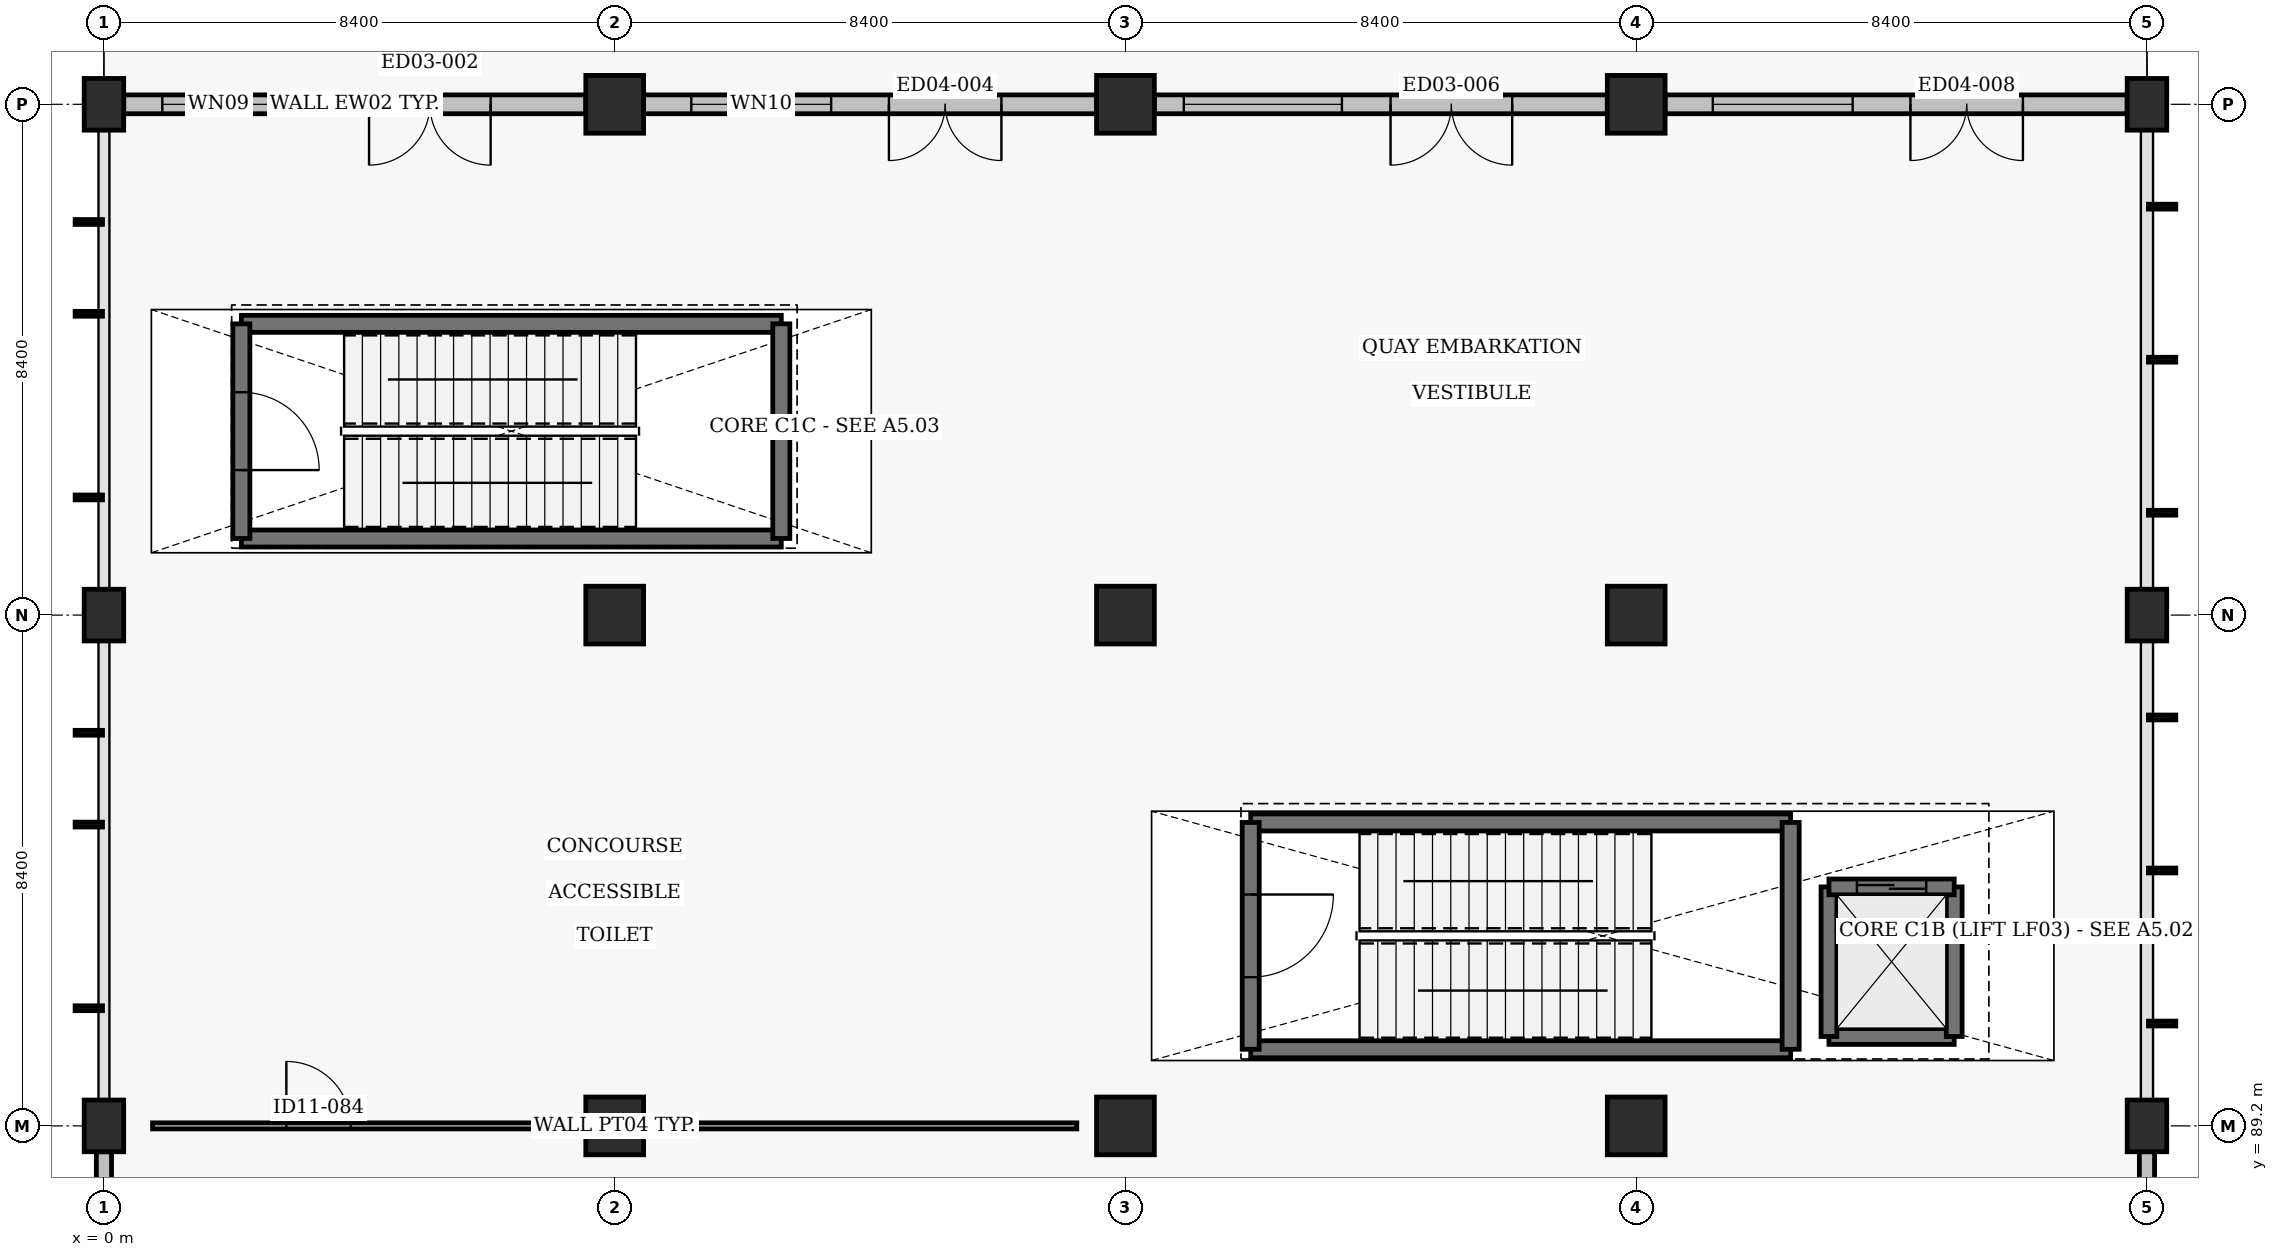
"""IFC4 building model, lengths in metres.
Left out: names, types, materials, properties, quantities, classifications, styles, units other than length and angle.
Written with IfcOpenShell. Run it as: python <this file> out.ifc"""

import sys

from ifc_helpers import new_model, si_unit, direction, frame, frame_2d, origin, origin_2d, place, context, subcontext, project, spatial, rectangle, circle, extrude, element, fill, save


model = new_model("IFC4")
c1 = context("Model", 3, precision=1e-05, world=origin(), true_north=direction((0.0, 1.0)))
c2 = subcontext(c1, "Body", "Model", "MODEL_VIEW")
j1 = project(units=[si_unit("LENGTHUNIT", "METRE"), si_unit("PLANEANGLEUNIT", "RADIAN")], contexts=[c1])
p1 = place(None, origin())
s1 = spatial("IfcSite", under=j1, at=p1, CompositionType="ELEMENT")
p2 = place(p1, origin())
s2 = spatial("IfcBuilding", under=s1, at=p2, CompositionType="ELEMENT")
p3 = place(p2, origin())
s3 = spatial("IfcBuildingStorey", under=s2, at=p3, CompositionType="ELEMENT", Elevation=0.0)
for number, where, z_axis, x_axis in (
    (1, (0.0, 89.2, -0.46), (0.0, 0.0, 1.0), (1.0, 0.0, 0.0)),
    (2, (0.0, 97.6, -0.46), (0.0, 0.0, 1.0), (1.0, 0.0, 0.0)),
    (3, (0.0, 106.0, -0.46), (0.0, 0.0, 1.0), (1.0, 0.0, 0.0)),
):
    element("IfcColumn", number, at=place(p3, frame(where, z_axis=z_axis, x_axis=x_axis)), inside=s3, PredefinedType="COLUMN", context=c2, shape_type="SweptSolid", body=[
        extrude(rectangle(XDim=0.65, YDim=0.85, at=origin_2d()), origin(), (0.0, 0.0, 1.0), 5.9),
    ])
for number, where, z_axis, x_axis in (
    (4, (8.4, 89.2, -0.46), (0.0, 0.0, 1.0), (1.0, 0.0, 0.0)),
    (5, (8.4, 97.6, -0.46), (0.0, 0.0, 1.0), (1.0, 0.0, 0.0)),
    (6, (8.4, 106.0, -0.46), (0.0, 0.0, 1.0), (1.0, 0.0, 0.0)),
    (7, (16.8, 89.2, -0.46), (0.0, 0.0, 1.0), (1.0, 0.0, 0.0)),
    (8, (16.8, 97.6, -0.46), (0.0, 0.0, 1.0), (1.0, 0.0, 0.0)),
    (9, (16.8, 106.0, -0.46), (0.0, 0.0, 1.0), (1.0, 0.0, 0.0)),
    (10, (25.2, 89.2, -0.46), (0.0, 0.0, 1.0), (1.0, 0.0, 0.0)),
    (11, (25.2, 97.6, -0.46), (0.0, 0.0, 1.0), (1.0, 0.0, 0.0)),
    (12, (25.2, 106.0, -0.46), (0.0, 0.0, 1.0), (1.0, 0.0, 0.0)),
):
    element("IfcColumn", number, at=place(p3, frame(where, z_axis=z_axis, x_axis=x_axis)), inside=s3, PredefinedType="COLUMN", context=c2, shape_type="SweptSolid", body=[
        extrude(circle(Radius=0.475, at=origin_2d()), origin(), (0.0, 0.0, 1.0), 5.9),
    ])
for number, where, z_axis, x_axis in (
    (13, (33.6, 89.2, -0.46), (0.0, 0.0, 1.0), (1.0, 0.0, 0.0)),
    (14, (33.6, 97.6, -0.46), (0.0, 0.0, 1.0), (1.0, 0.0, 0.0)),
    (15, (33.6, 106.0, -0.46), (0.0, 0.0, 1.0), (1.0, 0.0, 0.0)),
):
    element("IfcColumn", number, at=place(p3, frame(where, z_axis=z_axis, x_axis=x_axis)), inside=s3, PredefinedType="COLUMN", context=c2, shape_type="SweptSolid", body=[
        extrude(rectangle(XDim=0.65, YDim=0.85, at=origin_2d()), origin(), (0.0, 0.0, 1.0), 5.9),
    ])
p4 = place(p3, frame((7.925, 106.0, 0.0), z_axis=(0.0, 0.0, 1.0), x_axis=(-1.0, 0.0, 0.0)))
e16 = element("IfcWall", 16, at=p4, inside=s3, PredefinedType="SOLIDWALL", context=c2, shape_type="SweptSolid", body=[
    extrude(rectangle(XDim=7.6, YDim=0.31, at=frame_2d((3.8, 0.0))), origin(), (0.0, 0.0, 1.0), 4.795),
])
p5 = place(p4, frame((1.565, 0.0, 0.0)))
e17 = element("IfcOpeningElement", 17, at=p5, cuts=e16, PredefinedType="OPENING", context=c2, shape_type="SweptSolid", body=[
    extrude(rectangle(XDim=2.0, YDim=2.2, at=frame_2d((1.0, 1.1))), frame((0.0, 0.165, 0.0), z_axis=(0.0, -1.0, 0.0), x_axis=(1.0, 0.0, 0.0)), (0.0, 0.0, 1.0), 0.33),
])
p6 = place(p4, frame((4.365, 0.0, 1.0)))
e18 = element("IfcOpeningElement", 18, at=p6, cuts=e16, PredefinedType="OPENING", context=c2, shape_type="SweptSolid", body=[
    extrude(rectangle(XDim=2.6, YDim=1.7, at=frame_2d((1.3, 0.85))), frame((0.0, 0.165, 0.0), z_axis=(0.0, -1.0, 0.0), x_axis=(1.0, 0.0, 0.0)), (0.0, 0.0, 1.0), 0.33),
])
p7 = place(p3, frame((16.325, 106.0, 0.0), z_axis=(0.0, 0.0, 1.0), x_axis=(-1.0, 0.0, 0.0)))
e19 = element("IfcWall", 19, at=p7, inside=s3, PredefinedType="SOLIDWALL", context=c2, shape_type="SweptSolid", body=[
    extrude(rectangle(XDim=7.45, YDim=0.31, at=frame_2d((3.725, 0.0))), origin(), (0.0, 0.0, 1.0), 4.785),
])
p8 = place(p7, frame((1.565, 0.0, 0.0)))
e20 = element("IfcOpeningElement", 20, at=p8, cuts=e19, PredefinedType="OPENING", context=c2, shape_type="SweptSolid", body=[
    extrude(rectangle(XDim=1.85, YDim=2.2, at=frame_2d((0.925, 1.1))), frame((0.0, 0.165, 0.0), z_axis=(0.0, -1.0, 0.0), x_axis=(1.0, 0.0, 0.0)), (0.0, 0.0, 1.0), 0.33),
])
p9 = place(p7, frame((4.365, 0.0, 1.0)))
e21 = element("IfcOpeningElement", 21, at=p9, cuts=e19, PredefinedType="OPENING", context=c2, shape_type="SweptSolid", body=[
    extrude(rectangle(XDim=2.3, YDim=1.7, at=frame_2d((1.15, 0.85))), frame((0.0, 0.165, 0.0), z_axis=(0.0, -1.0, 0.0), x_axis=(1.0, 0.0, 0.0)), (0.0, 0.0, 1.0), 0.33),
])
p10 = place(p3, frame((24.725, 106.0, 0.0), z_axis=(0.0, 0.0, 1.0), x_axis=(-1.0, 0.0, 0.0)))
e22 = element("IfcWall", 22, at=p10, inside=s3, PredefinedType="SOLIDWALL", context=c2, shape_type="SweptSolid", body=[
    extrude(rectangle(XDim=7.45, YDim=0.31, at=frame_2d((3.725, 0.0))), origin(), (0.0, 0.0, 1.0), 4.785),
])
p11 = place(p10, frame((1.565, 0.0, 0.0)))
e23 = element("IfcOpeningElement", 23, at=p11, cuts=e22, PredefinedType="OPENING", context=c2, shape_type="SweptSolid", body=[
    extrude(rectangle(XDim=2.0, YDim=2.2, at=frame_2d((1.0, 1.1))), frame((0.0, 0.165, 0.0), z_axis=(0.0, -1.0, 0.0), x_axis=(1.0, 0.0, 0.0)), (0.0, 0.0, 1.0), 0.33),
])
p12 = place(p10, frame((4.365, 0.0, 1.0)))
e24 = element("IfcOpeningElement", 24, at=p12, cuts=e22, PredefinedType="OPENING", context=c2, shape_type="SweptSolid", body=[
    extrude(rectangle(XDim=2.6, YDim=1.7, at=frame_2d((1.3, 0.85))), frame((0.0, 0.165, 0.0), z_axis=(0.0, -1.0, 0.0), x_axis=(1.0, 0.0, 0.0)), (0.0, 0.0, 1.0), 0.33),
])
p13 = place(p3, frame((33.275, 106.0, 0.0), z_axis=(0.0, 0.0, 1.0), x_axis=(-1.0, 0.0, 0.0)))
e25 = element("IfcWall", 25, at=p13, inside=s3, PredefinedType="SOLIDWALL", context=c2, shape_type="SweptSolid", body=[
    extrude(rectangle(XDim=7.6, YDim=0.31, at=frame_2d((3.8, 0.0))), origin(), (0.0, 0.0, 1.0), 4.785),
])
p14 = place(p13, frame((1.715, 0.0, 0.0)))
e26 = element("IfcOpeningElement", 26, at=p14, cuts=e25, PredefinedType="OPENING", context=c2, shape_type="SweptSolid", body=[
    extrude(rectangle(XDim=1.85, YDim=2.2, at=frame_2d((0.925, 1.1))), frame((0.0, 0.165, 0.0), z_axis=(0.0, -1.0, 0.0), x_axis=(1.0, 0.0, 0.0)), (0.0, 0.0, 1.0), 0.33),
])
p15 = place(p13, frame((4.515, 0.0, 1.0)))
e27 = element("IfcOpeningElement", 27, at=p15, cuts=e25, PredefinedType="OPENING", context=c2, shape_type="SweptSolid", body=[
    extrude(rectangle(XDim=2.3, YDim=1.7, at=frame_2d((1.15, 0.85))), frame((0.0, 0.165, 0.0), z_axis=(0.0, -1.0, 0.0), x_axis=(1.0, 0.0, 0.0)), (0.0, 0.0, 1.0), 0.33),
])
for number, where, z_axis, x_axis in (
    (28, (0.0, 88.775, 0.0), (0.0, 0.0, 1.0), (0.0, -1.0, 0.0)),
    (29, (33.6, 81.225, 0.0), (0.0, 0.0, 1.0), (0.0, 1.0, 0.0)),
):
    element("IfcWall", number, at=place(p3, frame(where, z_axis=z_axis, x_axis=x_axis)), inside=s3, PredefinedType="SOLIDWALL", context=c2, shape_type="SweptSolid", body=[
        extrude(rectangle(XDim=7.55, YDim=0.25, at=frame_2d((3.775, 0.0))), origin(), (0.0, 0.0, 1.0), 4.795),
    ])
for number, where, z_axis, x_axis in (
    (30, (18.86, 90.46, 0.0), (0.0, 0.0, 1.0), (1.0, 0.0, 0.0)),
    (31, (18.86, 94.19, 0.0), (0.0, 0.0, 1.0), (1.0, 0.0, 0.0)),
):
    element("IfcWall", number, at=place(p3, frame(where, z_axis=z_axis, x_axis=x_axis)), inside=s3, PredefinedType="SHEAR", context=c2, shape_type="SweptSolid", body=[
        extrude(rectangle(XDim=8.88, YDim=0.28, at=frame_2d((4.44, 0.0))), origin(), (0.0, 0.0, 1.0), 5.44),
    ])
p16 = place(p3, frame((18.86, 94.19, 0.0), z_axis=(0.0, 0.0, 1.0), x_axis=(0.0, -1.0, 0.0)))
e32 = element("IfcWall", 32, at=p16, inside=s3, PredefinedType="SHEAR", context=c2, shape_type="SweptSolid", body=[
    extrude(rectangle(XDim=3.73, YDim=0.28, at=frame_2d((1.865, 0.0))), origin(), (0.0, 0.0, 1.0), 5.44),
])
p17 = place(p16, frame((1.185, 0.0, 0.0)))
e33 = element("IfcOpeningElement", 33, at=p17, cuts=e32, PredefinedType="OPENING", context=c2, shape_type="SweptSolid", body=[
    extrude(rectangle(XDim=1.36, YDim=2.15, at=frame_2d((0.68, 1.075))), frame((0.0, 0.15, 0.0), z_axis=(0.0, -1.0, 0.0), x_axis=(1.0, 0.0, 0.0)), (0.0, 0.0, 1.0), 0.3),
])
p18 = place(p3, frame((27.74, 90.46, 0.0), z_axis=(0.0, 0.0, 1.0), x_axis=(0.0, 1.0, 0.0)))
e34 = element("IfcWall", 34, at=p18, inside=s3, PredefinedType="SHEAR", context=c2, shape_type="SweptSolid", body=[
    extrude(rectangle(XDim=3.73, YDim=0.28, at=frame_2d((1.865, 0.0))), origin(), (0.0, 0.0, 1.0), 5.44),
])
p19 = place(p3, frame((28.37, 90.67, 0.0), z_axis=(0.0, 0.0, 1.0), x_axis=(1.0, 0.0, 0.0)))
e35 = element("IfcWall", 35, at=p19, inside=s3, PredefinedType="SHEAR", context=c2, shape_type="SweptSolid", body=[
    extrude(rectangle(XDim=2.06, YDim=0.26, at=frame_2d((1.03, 0.0))), origin(), (0.0, 0.0, 1.0), 5.44),
])
for number, where, z_axis, x_axis in (
    (36, (30.43, 90.67, 0.0), (0.0, 0.0, 1.0), (0.0, 1.0, 0.0)),
    (37, (28.37, 93.13, 0.0), (0.0, 0.0, 1.0), (0.0, -1.0, 0.0)),
):
    element("IfcWall", number, at=place(p3, frame(where, z_axis=z_axis, x_axis=x_axis)), inside=s3, PredefinedType="SHEAR", context=c2, shape_type="SweptSolid", body=[
        extrude(rectangle(XDim=2.46, YDim=0.26, at=frame_2d((1.23, 0.0))), origin(), (0.0, 0.0, 1.0), 5.44),
    ])
p20 = place(p3, frame((28.37, 93.13, 0.0), z_axis=(0.0, 0.0, 1.0), x_axis=(1.0, 0.0, 0.0)))
e38 = element("IfcWall", 38, at=p20, inside=s3, PredefinedType="SHEAR", context=c2, shape_type="SweptSolid", body=[
    extrude(rectangle(XDim=2.06, YDim=0.26, at=frame_2d((1.03, 0.0))), origin(), (0.0, 0.0, 1.0), 5.44),
])
p21 = place(p20, frame((0.46, 0.0, 0.0)))
e39 = element("IfcOpeningElement", 39, at=p21, cuts=e38, PredefinedType="OPENING", context=c2, shape_type="SweptSolid", body=[
    extrude(rectangle(XDim=1.14, YDim=2.14, at=frame_2d((0.57, 1.07))), frame((0.0, 0.14, 0.0), z_axis=(0.0, -1.0, 0.0), x_axis=(1.0, 0.0, 0.0)), (0.0, 0.0, 1.0), 0.28),
])
for number, where, z_axis, x_axis in (
    (40, (2.26, 98.86, 0.0), (0.0, 0.0, 1.0), (1.0, 0.0, 0.0)),
    (41, (2.26, 102.39, 0.0), (0.0, 0.0, 1.0), (1.0, 0.0, 0.0)),
):
    element("IfcWall", number, at=place(p3, frame(where, z_axis=z_axis, x_axis=x_axis)), inside=s3, PredefinedType="SHEAR", context=c2, shape_type="SweptSolid", body=[
        extrude(rectangle(XDim=8.88, YDim=0.28, at=frame_2d((4.44, 0.0))), origin(), (0.0, 0.0, 1.0), 5.44),
    ])
p22 = place(p3, frame((2.26, 102.39, 0.0), z_axis=(0.0, 0.0, 1.0), x_axis=(0.0, -1.0, 0.0)))
e42 = element("IfcWall", 42, at=p22, inside=s3, PredefinedType="SHEAR", context=c2, shape_type="SweptSolid", body=[
    extrude(rectangle(XDim=3.53, YDim=0.28, at=frame_2d((1.765, 0.0))), origin(), (0.0, 0.0, 1.0), 5.44),
])
p23 = place(p22, frame((1.125, 0.0, 0.0)))
e43 = element("IfcOpeningElement", 43, at=p23, cuts=e42, PredefinedType="OPENING", context=c2, shape_type="SweptSolid", body=[
    extrude(rectangle(XDim=1.28, YDim=2.1, at=frame_2d((0.64, 1.05))), frame((0.0, 0.15, 0.0), z_axis=(0.0, -1.0, 0.0), x_axis=(1.0, 0.0, 0.0)), (0.0, 0.0, 1.0), 0.3),
])
p24 = place(p3, frame((11.14, 98.86, 0.0), z_axis=(0.0, 0.0, 1.0), x_axis=(0.0, 1.0, 0.0)))
e44 = element("IfcWall", 44, at=p24, inside=s3, PredefinedType="SHEAR", context=c2, shape_type="SweptSolid", body=[
    extrude(rectangle(XDim=3.53, YDim=0.28, at=frame_2d((1.765, 0.0))), origin(), (0.0, 0.0, 1.0), 5.44),
])
p25 = place(p3, frame((0.8, 89.2, 0.0), z_axis=(0.0, 0.0, 1.0), x_axis=(1.0, 0.0, 0.0)))
e45 = element("IfcWall", 45, at=p25, inside=s3, PredefinedType="PARTITIONING", context=c2, shape_type="SweptSolid", body=[
    extrude(rectangle(XDim=15.2, YDim=0.1, at=frame_2d((7.6, 0.0))), origin(), (0.0, 0.0, 1.0), 3.0),
])
p26 = place(p25, frame((2.2, 0.0, 0.0)))
e46 = element("IfcOpeningElement", 46, at=p26, cuts=e45, PredefinedType="OPENING", context=c2, shape_type="SweptSolid", body=[
    extrude(rectangle(XDim=1.06, YDim=2.1, at=frame_2d((0.53, 1.05))), frame((0.0, 0.06, 0.0), z_axis=(0.0, -1.0, 0.0), x_axis=(1.0, 0.0, 0.0)), (0.0, 0.0, 1.0), 0.12),
])
p27 = place(p5, origin())
e47 = element("IfcDoor", 47, at=p27, inside=s3, OperationType="DOUBLE_DOOR_SINGLE_SWING", PredefinedType="DOOR", context=c2, shape_type="SweptSolid", body=[
    extrude(rectangle(XDim=2.0, YDim=2.2, at=frame_2d((1.0, 1.1))), frame((0.0, 0.025, 0.0), z_axis=(0.0, -1.0, 0.0), x_axis=(1.0, 0.0, 0.0)), (0.0, 0.0, 1.0), 0.05),
])
fill(e17, e47)
p28 = place(p6, origin())
e48 = element("IfcWindow", 48, at=p28, inside=s3, PartitioningType="TRIPLE_PANEL_VERTICAL", PredefinedType="WINDOW", context=c2, shape_type="SweptSolid", body=[
    extrude(rectangle(XDim=2.6, YDim=1.7, at=frame_2d((1.3, 0.85))), frame((0.0, 0.03, 0.0), z_axis=(0.0, -1.0, 0.0), x_axis=(1.0, 0.0, 0.0)), (0.0, 0.0, 1.0), 0.06),
])
fill(e18, e48)
p29 = place(p8, origin())
e49 = element("IfcDoor", 49, at=p29, inside=s3, OperationType="DOUBLE_DOOR_SINGLE_SWING", PredefinedType="DOOR", context=c2, shape_type="SweptSolid", body=[
    extrude(rectangle(XDim=1.85, YDim=2.2, at=frame_2d((0.925, 1.1))), frame((0.0, 0.025, 0.0), z_axis=(0.0, -1.0, 0.0), x_axis=(1.0, 0.0, 0.0)), (0.0, 0.0, 1.0), 0.05),
])
fill(e20, e49)
p30 = place(p9, origin())
e50 = element("IfcWindow", 50, at=p30, inside=s3, PartitioningType="TRIPLE_PANEL_VERTICAL", PredefinedType="WINDOW", context=c2, shape_type="SweptSolid", body=[
    extrude(rectangle(XDim=2.3, YDim=1.7, at=frame_2d((1.15, 0.85))), frame((0.0, 0.03, 0.0), z_axis=(0.0, -1.0, 0.0), x_axis=(1.0, 0.0, 0.0)), (0.0, 0.0, 1.0), 0.06),
])
fill(e21, e50)
p31 = place(p11, origin())
e51 = element("IfcDoor", 51, at=p31, inside=s3, OperationType="DOUBLE_DOOR_SINGLE_SWING", PredefinedType="DOOR", context=c2, shape_type="SweptSolid", body=[
    extrude(rectangle(XDim=2.0, YDim=2.2, at=frame_2d((1.0, 1.1))), frame((0.0, 0.025, 0.0), z_axis=(0.0, -1.0, 0.0), x_axis=(1.0, 0.0, 0.0)), (0.0, 0.0, 1.0), 0.05),
])
fill(e23, e51)
p32 = place(p12, origin())
e52 = element("IfcWindow", 52, at=p32, inside=s3, PartitioningType="TRIPLE_PANEL_VERTICAL", PredefinedType="WINDOW", context=c2, shape_type="SweptSolid", body=[
    extrude(rectangle(XDim=2.6, YDim=1.7, at=frame_2d((1.3, 0.85))), frame((0.0, 0.03, 0.0), z_axis=(0.0, -1.0, 0.0), x_axis=(1.0, 0.0, 0.0)), (0.0, 0.0, 1.0), 0.06),
])
fill(e24, e52)
p33 = place(p14, origin())
e53 = element("IfcDoor", 53, at=p33, inside=s3, OperationType="DOUBLE_DOOR_SINGLE_SWING", PredefinedType="DOOR", context=c2, shape_type="SweptSolid", body=[
    extrude(rectangle(XDim=1.85, YDim=2.2, at=frame_2d((0.925, 1.1))), frame((0.0, 0.025, 0.0), z_axis=(0.0, -1.0, 0.0), x_axis=(1.0, 0.0, 0.0)), (0.0, 0.0, 1.0), 0.05),
])
fill(e26, e53)
p34 = place(p15, origin())
e54 = element("IfcWindow", 54, at=p34, inside=s3, PartitioningType="TRIPLE_PANEL_VERTICAL", PredefinedType="WINDOW", context=c2, shape_type="SweptSolid", body=[
    extrude(rectangle(XDim=2.3, YDim=1.7, at=frame_2d((1.15, 0.85))), frame((0.0, 0.03, 0.0), z_axis=(0.0, -1.0, 0.0), x_axis=(1.0, 0.0, 0.0)), (0.0, 0.0, 1.0), 0.06),
])
fill(e27, e54)
p35 = place(p17, origin())
e55 = element("IfcDoor", 55, at=p35, inside=s3, OperationType="SINGLE_SWING_LEFT", PredefinedType="DOOR", context=c2, shape_type="SweptSolid", body=[
    extrude(rectangle(XDim=1.36, YDim=2.15, at=frame_2d((0.68, 1.075))), frame((0.0, 0.025, 0.0), z_axis=(0.0, -1.0, 0.0), x_axis=(1.0, 0.0, 0.0)), (0.0, 0.0, 1.0), 0.05),
])
fill(e33, e55)
p36 = place(p21, origin())
e56 = element("IfcDoor", 56, at=p36, inside=s3, OperationType="DOUBLE_DOOR_SLIDING", PredefinedType="DOOR", context=c2, shape_type="SweptSolid", body=[
    extrude(rectangle(XDim=1.14, YDim=2.14, at=frame_2d((0.57, 1.07))), frame((0.0, 0.025, 0.0), z_axis=(0.0, -1.0, 0.0), x_axis=(1.0, 0.0, 0.0)), (0.0, 0.0, 1.0), 0.05),
])
fill(e39, e56)
p37 = place(p23, origin())
e57 = element("IfcDoor", 57, at=p37, inside=s3, OperationType="SINGLE_SWING_RIGHT", PredefinedType="DOOR", context=c2, shape_type="SweptSolid", body=[
    extrude(rectangle(XDim=1.28, YDim=2.1, at=frame_2d((0.64, 1.05))), frame((0.0, 0.025, 0.0), z_axis=(0.0, -1.0, 0.0), x_axis=(1.0, 0.0, 0.0)), (0.0, 0.0, 1.0), 0.05),
])
fill(e43, e57)
p38 = place(p26, origin())
e58 = element("IfcDoor", 58, at=p38, inside=s3, OperationType="SINGLE_SWING_LEFT", PredefinedType="DOOR", context=c2, shape_type="SweptSolid", body=[
    extrude(rectangle(XDim=1.06, YDim=2.1, at=frame_2d((0.53, 1.05))), frame((0.0, 0.025, 0.0), z_axis=(0.0, -1.0, 0.0), x_axis=(1.0, 0.0, 0.0)), (0.0, 0.0, 1.0), 0.05),
])
fill(e46, e58)
save(model, sys.argv[1])
